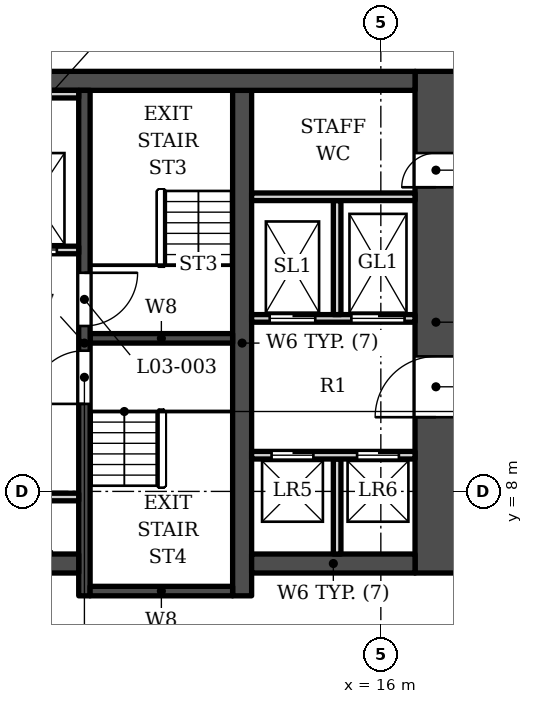
"""IFC4 building model, lengths in metres.
Left out: names, types, materials, properties, quantities, classifications, styles, units other than length and angle.
Written with IfcOpenShell. Run it as: python <this file> out.ifc"""

import sys

from ifc_helpers import new_model, si_unit, direction, frame, frame_2d, origin, place, context, subcontext, project, spatial, rectangle, extrude, element, fill, save


model = new_model("IFC4")
c1 = context("Model", 3, precision=1e-05, world=origin(), true_north=direction((0.0, 1.0)))
c2 = subcontext(c1, "Body", "Model", "MODEL_VIEW")
j1 = project(units=[si_unit("LENGTHUNIT", "METRE"), si_unit("PLANEANGLEUNIT", "RADIAN")], contexts=[c1])
p1 = place(None, origin())
s1 = spatial("IfcSite", under=j1, at=p1, CompositionType="ELEMENT")
p2 = place(p1, origin())
s2 = spatial("IfcBuilding", under=s1, at=p2, CompositionType="ELEMENT")
p3 = place(p2, frame((0.0, 0.0, 29.0)))
s3 = spatial("IfcBuildingStorey", under=s2, at=p3, CompositionType="ELEMENT", Elevation=29.0)
p4 = place(p3, frame((-16.9, 18.802, 0.0), z_axis=(0.0, 0.0, 1.0), x_axis=(1.0, 0.0, 0.0)))
e1 = element("IfcWall", 1, at=p4, inside=s3, PredefinedType="SHEAR", context=c2, shape_type="SweptSolid", body=[
    extrude(rectangle(XDim=33.8, YDim=0.5, at=frame_2d((16.9, 0.0))), origin(), (0.0, 0.0, 1.0), 5.5),
])
p5 = place(p3, frame((12.35, 5.253, 0.0), z_axis=(0.0, 0.0, 1.0), x_axis=(0.0, 1.0, 0.0)))
e2 = element("IfcWall", 2, at=p5, inside=s3, PredefinedType="SHEAR", context=c2, shape_type="SweptSolid", body=[
    extrude(rectangle(XDim=13.3, YDim=0.5, at=frame_2d((6.65, 0.0))), origin(), (0.0, 0.0, 1.0), 5.5),
])
p6 = place(p3, frame((8.2, 5.253, 0.0), z_axis=(0.0, 0.0, 1.0), x_axis=(0.0, 1.0, 0.0)))
e3 = element("IfcWall", 3, at=p6, inside=s3, PredefinedType="SHEAR", context=c2, shape_type="SweptSolid", body=[
    extrude(rectangle(XDim=13.3, YDim=0.3, at=frame_2d((6.65, 0.0))), origin(), (0.0, 0.0, 1.0), 5.5),
])
p7 = place(p6, frame((7.1, 0.0, 0.0)))
e4 = element("IfcOpeningElement", 4, at=p7, cuts=e3, PredefinedType="OPENING", context=c2, shape_type="SweptSolid", body=[
    extrude(rectangle(XDim=1.4, YDim=2.1, at=frame_2d((0.7, 1.05))), frame((0.0, 0.16, 0.0), z_axis=(0.0, -1.0, 0.0), x_axis=(1.0, 0.0, 0.0)), (0.0, 0.0, 1.0), 0.32),
])
p8 = place(p6, frame((5.05, 0.0, 0.0)))
e5 = element("IfcOpeningElement", 5, at=p8, cuts=e3, PredefinedType="OPENING", context=c2, shape_type="SweptSolid", body=[
    extrude(rectangle(XDim=1.4, YDim=2.1, at=frame_2d((0.7, 1.05))), frame((0.0, 0.16, 0.0), z_axis=(0.0, -1.0, 0.0), x_axis=(1.0, 0.0, 0.0)), (0.0, 0.0, 1.0), 0.32),
])
for number, where, z_axis, x_axis in (
    (6, (8.35, 12.028, 0.0), (0.0, 0.0, 1.0), (1.0, 0.0, 0.0)),
    (7, (8.35, 5.378, 0.0), (0.0, 0.0, 1.0), (1.0, 0.0, 0.0)),
):
    element("IfcWall", number, at=place(p3, frame(where, z_axis=z_axis, x_axis=x_axis)), inside=s3, PredefinedType="SHEAR", context=c2, shape_type="SweptSolid", body=[
        extrude(rectangle(XDim=3.75, YDim=0.25, at=frame_2d((1.875, 0.0))), origin(), (0.0, 0.0, 1.0), 5.5),
    ])
p9 = place(p3, frame((1.0, 6.103, 0.0), z_axis=(0.0, 0.0, 1.0), x_axis=(1.0, 0.0, 0.0)))
e8 = element("IfcWall", 8, at=p9, inside=s3, PredefinedType="SHEAR", context=c2, shape_type="SweptSolid", body=[
    extrude(rectangle(XDim=7.05, YDim=0.5, at=frame_2d((3.525, 0.0))), origin(), (0.0, 0.0, 1.0), 5.5),
])
p10 = place(p9, frame((5.325, 0.0, 0.0)))
e9 = element("IfcOpeningElement", 9, at=p10, cuts=e8, PredefinedType="OPENING", context=c2, shape_type="SweptSolid", body=[
    extrude(rectangle(XDim=0.9, YDim=2.1, at=frame_2d((0.45, 1.05))), frame((0.0, 0.26, 0.0), z_axis=(0.0, -1.0, 0.0), x_axis=(1.0, 0.0, 0.0)), (0.0, 0.0, 1.0), 0.52),
])
p11 = place(p3, frame((12.6, 6.103, 0.0), z_axis=(0.0, 0.0, 1.0), x_axis=(1.0, 0.0, 0.0)))
e10 = element("IfcWall", 10, at=p11, inside=s3, PredefinedType="SHEAR", context=c2, shape_type="SweptSolid", body=[
    extrude(rectangle(XDim=4.3, YDim=0.5, at=frame_2d((2.15, 0.0))), origin(), (0.0, 0.0, 1.0), 5.5),
])
p12 = place(p3, frame((17.45, 5.853, 0.0), z_axis=(0.0, 0.0, 1.0), x_axis=(0.0, 1.0, 0.0)))
e11 = element("IfcWall", 11, at=p12, inside=s3, PredefinedType="SHEAR", context=c2, shape_type="SweptSolid", body=[
    extrude(rectangle(XDim=13.2, YDim=1.1, at=frame_2d((6.6, 0.0))), origin(), (0.0, 0.0, 1.0), 5.5),
])
p13 = place(p12, frame((4.1, 0.0, 0.0)))
e12 = element("IfcOpeningElement", 12, at=p13, cuts=e11, PredefinedType="OPENING", context=c2, shape_type="SweptSolid", body=[
    extrude(rectangle(XDim=1.6, YDim=2.1, at=frame_2d((0.8, 1.05))), frame((0.0, 0.56, 0.0), z_axis=(0.0, -1.0, 0.0), x_axis=(1.0, 0.0, 0.0)), (0.0, 0.0, 1.0), 1.12),
])
p14 = place(p12, frame((10.15, 0.0, 0.0)))
e13 = element("IfcOpeningElement", 13, at=p14, cuts=e11, PredefinedType="OPENING", context=c2, shape_type="SweptSolid", body=[
    extrude(rectangle(XDim=0.9, YDim=2.1, at=frame_2d((0.45, 1.05))), frame((0.0, 0.56, 0.0), z_axis=(0.0, -1.0, 0.0), x_axis=(1.0, 0.0, 0.0)), (0.0, 0.0, 1.0), 1.12),
])
for number, where, z_axis, x_axis in (
    (14, (14.85, 6.353, 0.0), (0.0, 0.0, 1.0), (0.0, 1.0, 0.0)),
    (15, (5.55, 7.853, 0.0), (0.0, 0.0, 1.0), (1.0, 0.0, 0.0)),
):
    element("IfcWall", number, at=place(p3, frame(where, z_axis=z_axis, x_axis=x_axis)), inside=s3, PredefinedType="SOLIDWALL", context=c2, shape_type="SweptSolid", body=[
        extrude(rectangle(XDim=2.5, YDim=0.2, at=frame_2d((1.25, 0.0))), origin(), (0.0, 0.0, 1.0), 5.05),
    ])
p15 = place(p3, frame((12.6, 8.953, 0.0), z_axis=(0.0, 0.0, 1.0), x_axis=(1.0, 0.0, 0.0)))
e16 = element("IfcWall", 16, at=p15, inside=s3, PredefinedType="SOLIDWALL", context=c2, shape_type="SweptSolid", body=[
    extrude(rectangle(XDim=4.3, YDim=0.2, at=frame_2d((2.15, 0.0))), origin(), (0.0, 0.0, 1.0), 5.05),
])
p16 = place(p15, frame((0.525, 0.0, 0.0)))
e17 = element("IfcOpeningElement", 17, at=p16, cuts=e16, PredefinedType="OPENING", context=c2, shape_type="SweptSolid", body=[
    extrude(rectangle(XDim=1.1, YDim=2.1, at=frame_2d((0.55, 1.05))), frame((0.0, 0.11, 0.0), z_axis=(0.0, -1.0, 0.0), x_axis=(1.0, 0.0, 0.0)), (0.0, 0.0, 1.0), 0.22),
])
p17 = place(p15, frame((2.775, 0.0, 0.0)))
e18 = element("IfcOpeningElement", 18, at=p17, cuts=e16, PredefinedType="OPENING", context=c2, shape_type="SweptSolid", body=[
    extrude(rectangle(XDim=1.1, YDim=2.1, at=frame_2d((0.55, 1.05))), frame((0.0, 0.11, 0.0), z_axis=(0.0, -1.0, 0.0), x_axis=(1.0, 0.0, 0.0)), (0.0, 0.0, 1.0), 0.22),
])
p18 = place(p3, frame((12.6, 12.552, 0.0), z_axis=(0.0, 0.0, 1.0), x_axis=(1.0, 0.0, 0.0)))
e19 = element("IfcWall", 19, at=p18, inside=s3, PredefinedType="SOLIDWALL", context=c2, shape_type="SweptSolid", body=[
    extrude(rectangle(XDim=4.3, YDim=0.2, at=frame_2d((2.15, 0.0))), origin(), (0.0, 0.0, 1.0), 5.05),
])
p19 = place(p18, frame((0.475, 0.0, 0.0)))
e20 = element("IfcOpeningElement", 20, at=p19, cuts=e19, PredefinedType="OPENING", context=c2, shape_type="SweptSolid", body=[
    extrude(rectangle(XDim=1.2, YDim=2.1, at=frame_2d((0.6, 1.05))), frame((0.0, 0.11, 0.0), z_axis=(0.0, -1.0, 0.0), x_axis=(1.0, 0.0, 0.0)), (0.0, 0.0, 1.0), 0.22),
])
p20 = place(p18, frame((2.625, 0.0, 0.0)))
e21 = element("IfcOpeningElement", 21, at=p20, cuts=e19, PredefinedType="OPENING", context=c2, shape_type="SweptSolid", body=[
    extrude(rectangle(XDim=1.4, YDim=2.1, at=frame_2d((0.7, 1.05))), frame((0.0, 0.11, 0.0), z_axis=(0.0, -1.0, 0.0), x_axis=(1.0, 0.0, 0.0)), (0.0, 0.0, 1.0), 0.22),
])
p21 = place(p3, frame((14.85, 12.653, 0.0), z_axis=(0.0, 0.0, 1.0), x_axis=(0.0, 1.0, 0.0)))
e22 = element("IfcWall", 22, at=p21, inside=s3, PredefinedType="SOLIDWALL", context=c2, shape_type="SweptSolid", body=[
    extrude(rectangle(XDim=3.0, YDim=0.2, at=frame_2d((1.5, 0.0))), origin(), (0.0, 0.0, 1.0), 5.05),
])
p22 = place(p3, frame((5.3, 14.353, 0.0), z_axis=(0.0, 0.0, 1.0), x_axis=(1.0, 0.0, 0.0)))
e23 = element("IfcWall", 23, at=p22, inside=s3, PredefinedType="SOLIDWALL", context=c2, shape_type="SweptSolid", body=[
    extrude(rectangle(XDim=2.75, YDim=0.2, at=frame_2d((1.375, 0.0))), origin(), (0.0, 0.0, 1.0), 5.05),
])
p23 = place(p22, frame((0.975, 0.0, 0.0)))
e24 = element("IfcOpeningElement", 24, at=p23, cuts=e23, PredefinedType="OPENING", context=c2, shape_type="SweptSolid", body=[
    extrude(rectangle(XDim=1.2, YDim=2.1, at=frame_2d((0.6, 1.05))), frame((0.0, 0.11, 0.0), z_axis=(0.0, -1.0, 0.0), x_axis=(1.0, 0.0, 0.0)), (0.0, 0.0, 1.0), 0.22),
])
p24 = place(p3, frame((12.6, 15.753, 0.0), z_axis=(0.0, 0.0, 1.0), x_axis=(1.0, 0.0, 0.0)))
e25 = element("IfcWall", 25, at=p24, inside=s3, PredefinedType="SOLIDWALL", context=c2, shape_type="SweptSolid", body=[
    extrude(rectangle(XDim=4.3, YDim=0.2, at=frame_2d((2.15, 0.0))), origin(), (0.0, 0.0, 1.0), 5.05),
])
p25 = place(p3, frame((5.5, 18.453, 0.0), z_axis=(0.0, 0.0, 1.0), x_axis=(1.0, 0.0, 0.0)))
e26 = element("IfcWall", 26, at=p25, inside=s3, PredefinedType="SOLIDWALL", context=c2, shape_type="SweptSolid", body=[
    extrude(rectangle(XDim=2.55, YDim=0.2, at=frame_2d((1.275, 0.0))), origin(), (0.0, 0.0, 1.0), 5.05),
])
p26 = place(p23, origin())
e27 = element("IfcDoor", 27, at=p26, inside=s3, OperationType="DOUBLE_DOOR_SLIDING", PredefinedType="DOOR", context=c2, shape_type="SweptSolid", body=[
    extrude(rectangle(XDim=1.2, YDim=2.1, at=frame_2d((0.6, 1.05))), frame((0.0, 0.025, 0.0), z_axis=(0.0, -1.0, 0.0), x_axis=(1.0, 0.0, 0.0)), (0.0, 0.0, 1.0), 0.05),
])
fill(e24, e27)
p27 = place(p16, origin())
e28 = element("IfcDoor", 28, at=p27, inside=s3, OperationType="DOUBLE_DOOR_SLIDING", PredefinedType="DOOR", context=c2, shape_type="SweptSolid", body=[
    extrude(rectangle(XDim=1.1, YDim=2.1, at=frame_2d((0.55, 1.05))), frame((0.0, 0.025, 0.0), z_axis=(0.0, -1.0, 0.0), x_axis=(1.0, 0.0, 0.0)), (0.0, 0.0, 1.0), 0.05),
])
fill(e17, e28)
p28 = place(p17, origin())
e29 = element("IfcDoor", 29, at=p28, inside=s3, OperationType="DOUBLE_DOOR_SLIDING", PredefinedType="DOOR", context=c2, shape_type="SweptSolid", body=[
    extrude(rectangle(XDim=1.1, YDim=2.1, at=frame_2d((0.55, 1.05))), frame((0.0, 0.025, 0.0), z_axis=(0.0, -1.0, 0.0), x_axis=(1.0, 0.0, 0.0)), (0.0, 0.0, 1.0), 0.05),
])
fill(e18, e29)
p29 = place(p19, origin())
e30 = element("IfcDoor", 30, at=p29, inside=s3, OperationType="DOUBLE_DOOR_SLIDING", PredefinedType="DOOR", context=c2, shape_type="SweptSolid", body=[
    extrude(rectangle(XDim=1.2, YDim=2.1, at=frame_2d((0.6, 1.05))), frame((0.0, 0.025, 0.0), z_axis=(0.0, -1.0, 0.0), x_axis=(1.0, 0.0, 0.0)), (0.0, 0.0, 1.0), 0.05),
])
fill(e20, e30)
p30 = place(p20, origin())
e31 = element("IfcDoor", 31, at=p30, inside=s3, OperationType="DOUBLE_DOOR_SLIDING", PredefinedType="DOOR", context=c2, shape_type="SweptSolid", body=[
    extrude(rectangle(XDim=1.4, YDim=2.1, at=frame_2d((0.7, 1.05))), frame((0.0, 0.025, 0.0), z_axis=(0.0, -1.0, 0.0), x_axis=(1.0, 0.0, 0.0)), (0.0, 0.0, 1.0), 0.05),
])
fill(e21, e31)
p31 = place(p7, origin())
e32 = element("IfcDoor", 32, at=p31, inside=s3, OperationType="SINGLE_SWING_RIGHT", PredefinedType="DOOR", context=c2, shape_type="SweptSolid", body=[
    extrude(rectangle(XDim=1.4, YDim=2.1, at=frame_2d((0.7, 1.05))), frame((0.0, 0.025, 0.0), z_axis=(0.0, -1.0, 0.0), x_axis=(1.0, 0.0, 0.0)), (0.0, 0.0, 1.0), 0.05),
])
fill(e4, e32)
p32 = place(p8, origin())
e33 = element("IfcDoor", 33, at=p32, inside=s3, OperationType="SINGLE_SWING_LEFT", PredefinedType="DOOR", context=c2, shape_type="SweptSolid", body=[
    extrude(rectangle(XDim=1.4, YDim=2.1, at=frame_2d((0.7, 1.05))), frame((0.0, 0.025, 0.0), z_axis=(0.0, -1.0, 0.0), x_axis=(1.0, 0.0, 0.0)), (0.0, 0.0, 1.0), 0.05),
])
fill(e5, e33)
p33 = place(p13, origin())
e34 = element("IfcDoor", 34, at=p33, inside=s3, OperationType="DOUBLE_DOOR_SINGLE_SWING", PredefinedType="DOOR", context=c2, shape_type="SweptSolid", body=[
    extrude(rectangle(XDim=1.6, YDim=2.1, at=frame_2d((0.8, 1.05))), frame((0.0, 0.275, 0.0), z_axis=(0.0, -1.0, 0.0), x_axis=(1.0, 0.0, 0.0)), (0.0, 0.0, 1.0), 0.05),
])
fill(e12, e34)
p34 = place(p14, origin())
e35 = element("IfcDoor", 35, at=p34, inside=s3, OperationType="SINGLE_SWING_LEFT", PredefinedType="DOOR", context=c2, shape_type="SweptSolid", body=[
    extrude(rectangle(XDim=0.9, YDim=2.1, at=frame_2d((0.45, 1.05))), frame((0.0, 0.275, 0.0), z_axis=(0.0, -1.0, 0.0), x_axis=(1.0, 0.0, 0.0)), (0.0, 0.0, 1.0), 0.05),
])
fill(e13, e35)
save(model, sys.argv[1])
